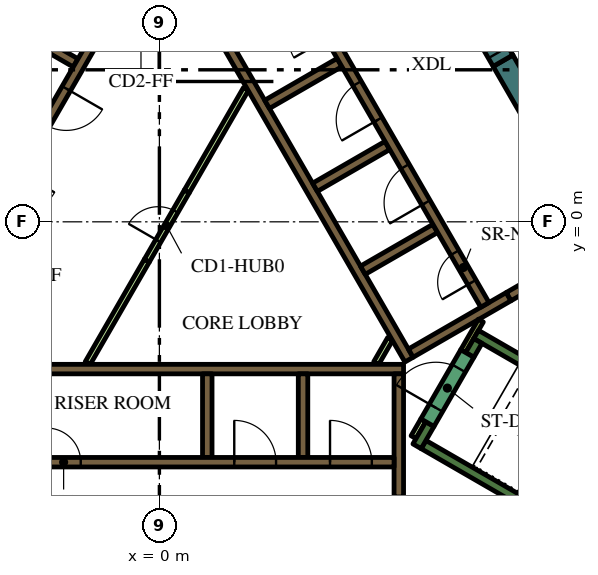
"""IFC4 building model, lengths in metres.
Left out: names, types, materials, properties, quantities, classifications, styles, units other than length and angle.
Written with IfcOpenShell. Run it as: python <this file> out.ifc"""

import sys

from ifc_helpers import new_model, si_unit, direction, frame, frame_2d, origin, place, context, subcontext, project, spatial, rectangle, extrude, element, fill, save


model = new_model("IFC4")
c1 = context("Model", 3, precision=1e-05, world=origin(), true_north=direction((0.0, 1.0)))
c2 = subcontext(c1, "Body", "Model", "MODEL_VIEW")
j1 = project(units=[si_unit("LENGTHUNIT", "METRE"), si_unit("PLANEANGLEUNIT", "RADIAN")], contexts=[c1])
p1 = place(None, origin())
s1 = spatial("IfcSite", under=j1, at=p1, CompositionType="ELEMENT")
p2 = place(p1, origin())
s2 = spatial("IfcBuilding", under=s1, at=p2, CompositionType="ELEMENT")
p3 = place(p2, frame((0.0, 0.0, 313.2)))
s3 = spatial("IfcBuildingStorey", under=s2, at=p3, CompositionType="ELEMENT", Elevation=313.2)
p4 = place(p3, frame((9.042, 4.239, 0.0), z_axis=(0.0, 0.0, 1.0), x_axis=(0.500005785455, -0.866022063525, 0.0)))
e1 = element("IfcWall", 1, at=p4, inside=s3, PredefinedType="SOLIDWALL", context=c2, shape_type="SweptSolid", body=[
    extrude(rectangle(XDim=12.406, YDim=0.6, at=frame_2d((6.203, 0.0))), origin(), (0.0, 0.0, 1.0), 4.2),
])
p5 = place(p3, frame((12.84, -9.261, 0.0), z_axis=(0.0, 0.0, 1.0), x_axis=(-0.866013990052, 0.500019768644, 0.0)))
e2 = element("IfcWall", 2, at=p5, inside=s3, PredefinedType="SOLIDWALL", context=c2, shape_type="SweptSolid", body=[
    extrude(rectangle(XDim=6.8, YDim=0.25, at=frame_2d((3.4, 0.0))), origin(), (0.0, 0.0, 1.0), 4.2),
])
p6 = place(p3, frame((6.78, -5.906, 0.0), z_axis=(0.0, 0.0, 1.0), x_axis=(0.500223362819, 0.865896406789, 0.0)))
e3 = element("IfcWall", 3, at=p6, inside=s3, PredefinedType="SOLIDWALL", context=c2, shape_type="SweptSolid", body=[
    extrude(rectangle(XDim=0.675, YDim=0.25, at=frame_2d((0.337, 0.0))), origin(), (0.0, 0.0, 1.0), 4.2),
])
p7 = place(p3, frame((8.334, -2.964, 0.0), z_axis=(0.0, 0.0, 1.0), x_axis=(0.866016039709, -0.500016218704, 0.0)))
e4 = element("IfcWall", 4, at=p7, inside=s3, PredefinedType="SOLIDWALL", context=c2, shape_type="SweptSolid", body=[
    extrude(rectangle(XDim=7.05, YDim=0.25, at=frame_2d((3.525, 0.0))), origin(), (0.0, 0.0, 1.0), 4.2),
])
p8 = place(p3, frame((8.168, -3.503, 0.0), z_axis=(0.0, 0.0, 1.0), x_axis=(0.49972245349, 0.866185586049, 0.0)))
e5 = element("IfcWall", 5, at=p8, inside=s3, PredefinedType="SOLIDWALL", context=c2, shape_type="SweptSolid", body=[
    extrude(rectangle(XDim=0.425, YDim=0.25, at=frame_2d((0.212, 0.0))), origin(), (0.0, 0.0, 1.0), 4.2),
])
p9 = place(p3, frame((-5.545, -3.875, 0.0), z_axis=(0.0, 0.0, 1.0), x_axis=(1.0, 0.0, 0.0)))
e6 = element("IfcWall", 6, at=p9, inside=s3, PredefinedType="SOLIDWALL", context=c2, shape_type="SweptSolid", body=[
    extrude(rectangle(XDim=11.97, YDim=0.25, at=frame_2d((5.985, 0.0))), origin(), (0.0, 0.0, 1.0), 4.2),
])
p10 = place(p3, frame((6.3, -7.24, 0.0), z_axis=(0.0, 0.0, 1.0), x_axis=(0.0, 1.0, 0.0)))
e7 = element("IfcWall", 7, at=p10, inside=s3, PredefinedType="SOLIDWALL", context=c2, shape_type="SweptSolid", body=[
    extrude(rectangle(XDim=3.24, YDim=0.25, at=frame_2d((1.62, 0.0))), origin(), (0.0, 0.0, 1.0), 4.2),
])
for number, where, z_axis, x_axis in (
    (8, (3.78, -4.0, 0.0), (0.0, 0.0, 1.0), (0.0, -1.0, 0.0)),
    (9, (1.26, -4.0, 0.0), (0.0, 0.0, 1.0), (0.0, -1.0, 0.0)),
):
    element("IfcWall", number, at=place(p3, frame(where, z_axis=z_axis, x_axis=x_axis)), inside=s3, PredefinedType="SOLIDWALL", context=c2, shape_type="SweptSolid", body=[
        extrude(rectangle(XDim=2.2, YDim=0.25, at=frame_2d((1.1, 0.0))), origin(), (0.0, 0.0, 1.0), 4.2),
    ])
p11 = place(p3, frame((6.568, -3.627, 0.0), z_axis=(0.0, 0.0, 1.0), x_axis=(-0.499999455981, 0.866025717874, 0.0)))
e10 = element("IfcWall", 10, at=p11, inside=s3, PredefinedType="SOLIDWALL", context=c2, shape_type="SweptSolid", body=[
    extrude(rectangle(XDim=11.978, YDim=0.25, at=frame_2d((5.989, 0.0))), origin(), (0.0, 0.0, 1.0), 4.2),
])
for number, where, z_axis, x_axis in (
    (11, (2.834, 3.091, 0.0), (0.0, 0.0, 1.0), (0.866, 0.5, 0.0)),
    (12, (4.094, 0.909, 0.0), (0.0, 0.0, 1.0), (0.866, 0.5, 0.0)),
    (13, (5.354, -1.274, 0.0), (0.0, 0.0, 1.0), (0.866, 0.5, 0.0)),
):
    element("IfcWall", number, at=place(p3, frame(where, z_axis=z_axis, x_axis=x_axis)), inside=s3, PredefinedType="SOLIDWALL", context=c2, shape_type="SweptSolid", body=[
        extrude(rectangle(XDim=2.2, YDim=0.25, at=frame_2d((1.1, 0.0))), origin(), (0.0, 0.0, 1.0), 4.2),
    ])
p12 = place(p3, frame((6.614, -3.456, 0.0), z_axis=(0.0, 0.0, 1.0), x_axis=(0.866032512851, 0.499987686533, 0.0)))
e14 = element("IfcWall", 14, at=p12, inside=s3, PredefinedType="SOLIDWALL", context=c2, shape_type="SweptSolid", body=[
    extrude(rectangle(XDim=2.975, YDim=0.25, at=frame_2d((1.487, 0.0))), origin(), (0.0, 0.0, 1.0), 4.2),
])
p13 = place(p3, frame((-8.06, -1.311, 0.0), z_axis=(0.0, 0.0, 1.0), x_axis=(0.50000273126, 0.866023826885, 0.0)))
e15 = element("IfcWall", 15, at=p13, inside=s3, PredefinedType="SOLIDWALL", context=c2, shape_type="SweptSolid", body=[
    extrude(rectangle(XDim=10.33, YDim=0.25, at=frame_2d((5.165, 0.0))), origin(), (0.0, 0.0, 1.0), 4.2),
])
p14 = place(p3, frame((-2.204, 4.182, 0.0), z_axis=(0.0, 0.0, 1.0), x_axis=(-0.866008176907, 0.50002983664, 0.0)))
e16 = element("IfcWall", 16, at=p14, inside=s3, PredefinedType="SOLIDWALL", context=c2, shape_type="SweptSolid", body=[
    extrude(rectangle(XDim=2.2, YDim=0.25, at=frame_2d((1.1, 0.0))), origin(), (0.0, 0.0, 1.0), 4.2),
])
p15 = place(p3, frame((6.945, -5.222, 0.0), z_axis=(0.0, 0.0, 1.0), x_axis=(-0.499818422106, -0.866130212453, 0.0)))
e17 = element("IfcWall", 17, at=p15, inside=s3, PredefinedType="PARTITIONING", context=c2, shape_type="SweptSolid", body=[
    extrude(rectangle(XDim=0.514, YDim=0.15, at=frame_2d((0.257, 0.0))), origin(), (0.0, 0.0, 1.0), 3.55),
])
p16 = place(p3, frame((8.459, -2.599, 0.0), z_axis=(0.0, 0.0, 1.0), x_axis=(-0.500041054325, -0.866001699761, 0.0)))
e18 = element("IfcWall", 18, at=p16, inside=s3, PredefinedType="PARTITIONING", context=c2, shape_type="SweptSolid", body=[
    extrude(rectangle(XDim=0.929, YDim=0.15, at=frame_2d((0.464, 0.0))), origin(), (0.0, 0.0, 1.0), 4.2),
])
p17 = place(p3, frame((5.705, -3.718, 0.0), z_axis=(0.0, 0.0, 1.0), x_axis=(0.499962090823, 0.866047289552, 0.0)))
e19 = element("IfcWall", 19, at=p17, inside=s3, PredefinedType="PARTITIONING", context=c2, shape_type="SweptSolid", body=[
    extrude(rectangle(XDim=0.735, YDim=0.15, at=frame_2d((0.367, 0.0))), origin(), (0.0, 0.0, 1.0), 3.55),
])
p18 = place(p3, frame((-1.887, -3.718, 0.0), z_axis=(0.0, 0.0, 1.0), x_axis=(0.500043732237, 0.866000153493, 0.0)))
e20 = element("IfcWall", 20, at=p18, inside=s3, PredefinedType="PARTITIONING", context=c2, shape_type="SweptSolid", body=[
    extrude(rectangle(XDim=3.114, YDim=0.15, at=frame_2d((1.557, 0.0))), origin(), (0.0, 0.0, 1.0), 3.55),
])
p19 = place(p3, frame((0.72, 0.797, 0.0), z_axis=(0.0, 0.0, 1.0), x_axis=(0.499984921984, 0.866034108906, 0.0)))
e21 = element("IfcWall", 21, at=p19, inside=s3, PredefinedType="PARTITIONING", context=c2, shape_type="SweptSolid", body=[
    extrude(rectangle(XDim=3.113, YDim=0.15, at=frame_2d((1.557, 0.0))), origin(), (0.0, 0.0, 1.0), 3.55),
])
p20 = place(p3, frame((-6.175, -6.325, 0.0), z_axis=(0.0, 0.0, 1.0), x_axis=(1.0, 0.0, 0.0)))
e22 = element("IfcWall", 22, at=p20, inside=s3, PredefinedType="SOLIDWALL", context=c2, shape_type="SweptSolid", body=[
    extrude(rectangle(XDim=12.35, YDim=0.25, at=frame_2d((6.175, 0.0))), origin(), (0.0, 0.0, 1.0), 4.2),
])
p21 = place(p20, frame((3.205, 0.0, 0.0)))
e23 = element("IfcOpeningElement", 23, at=p21, cuts=e22, PredefinedType="OPENING", context=c2, shape_type="SweptSolid", body=[
    extrude(rectangle(XDim=0.9, YDim=2.1, at=frame_2d((0.45, 1.05))), frame((0.0, 0.135, 0.0), z_axis=(0.0, -1.0, 0.0), x_axis=(1.0, 0.0, 0.0)), (0.0, 0.0, 1.0), 0.27),
])
p22 = place(p20, frame((8.145, 0.0, 0.0)))
e24 = element("IfcOpeningElement", 24, at=p22, cuts=e22, PredefinedType="OPENING", context=c2, shape_type="SweptSolid", body=[
    extrude(rectangle(XDim=1.1, YDim=2.1, at=frame_2d((0.55, 1.05))), frame((0.0, 0.135, 0.0), z_axis=(0.0, -1.0, 0.0), x_axis=(1.0, 0.0, 0.0)), (0.0, 0.0, 1.0), 0.27),
])
p23 = place(p20, frame((10.665, 0.0, 0.0)))
e25 = element("IfcOpeningElement", 25, at=p23, cuts=e22, PredefinedType="OPENING", context=c2, shape_type="SweptSolid", body=[
    extrude(rectangle(XDim=1.1, YDim=2.1, at=frame_2d((0.55, 1.05))), frame((0.0, 0.135, 0.0), z_axis=(0.0, -1.0, 0.0), x_axis=(1.0, 0.0, 0.0)), (0.0, 0.0, 1.0), 0.27),
])
p24 = place(p3, frame((8.565, -2.185, 0.0), z_axis=(0.0, 0.0, 1.0), x_axis=(-0.499997954832, 0.866026584559, 0.0)))
e26 = element("IfcWall", 26, at=p24, inside=s3, PredefinedType="SOLIDWALL", context=c2, shape_type="SweptSolid", body=[
    extrude(rectangle(XDim=12.35, YDim=0.25, at=frame_2d((6.175, 0.0))), origin(), (0.0, 0.0, 1.0), 4.2),
])
p25 = place(p24, frame((0.685, 0.0, 0.0)))
e27 = element("IfcOpeningElement", 27, at=p25, cuts=e26, PredefinedType="OPENING", context=c2, shape_type="SweptSolid", body=[
    extrude(rectangle(XDim=0.9, YDim=2.1, at=frame_2d((0.45, 1.05))), frame((0.0, 0.135, 0.0), z_axis=(0.0, -1.0, 0.0), x_axis=(1.0, 0.0, 0.0)), (0.0, 0.0, 1.0), 0.27),
])
p26 = place(p24, frame((3.105, 0.0, 0.0)))
e28 = element("IfcOpeningElement", 28, at=p26, cuts=e26, PredefinedType="OPENING", context=c2, shape_type="SweptSolid", body=[
    extrude(rectangle(XDim=1.1, YDim=2.1, at=frame_2d((0.55, 1.05))), frame((0.0, 0.135, 0.0), z_axis=(0.0, -1.0, 0.0), x_axis=(1.0, 0.0, 0.0)), (0.0, 0.0, 1.0), 0.27),
])
p27 = place(p24, frame((5.625, 0.0, 0.0)))
e29 = element("IfcOpeningElement", 29, at=p27, cuts=e26, PredefinedType="OPENING", context=c2, shape_type="SweptSolid", body=[
    extrude(rectangle(XDim=1.1, YDim=2.1, at=frame_2d((0.55, 1.05))), frame((0.0, 0.135, 0.0), z_axis=(0.0, -1.0, 0.0), x_axis=(1.0, 0.0, 0.0)), (0.0, 0.0, 1.0), 0.27),
])
p28 = place(p24, frame((8.145, 0.0, 0.0)))
e30 = element("IfcOpeningElement", 30, at=p28, cuts=e26, PredefinedType="OPENING", context=c2, shape_type="SweptSolid", body=[
    extrude(rectangle(XDim=1.1, YDim=2.1, at=frame_2d((0.55, 1.05))), frame((0.0, 0.135, 0.0), z_axis=(0.0, -1.0, 0.0), x_axis=(1.0, 0.0, 0.0)), (0.0, 0.0, 1.0), 0.27),
])
p29 = place(p24, frame((10.665, 0.0, 0.0)))
e31 = element("IfcOpeningElement", 31, at=p29, cuts=e26, PredefinedType="OPENING", context=c2, shape_type="SweptSolid", body=[
    extrude(rectangle(XDim=1.1, YDim=2.1, at=frame_2d((0.55, 1.05))), frame((0.0, 0.135, 0.0), z_axis=(0.0, -1.0, 0.0), x_axis=(1.0, 0.0, 0.0)), (0.0, 0.0, 1.0), 0.27),
])
p30 = place(p3, frame((-0.898, 6.194, 0.0), z_axis=(0.0, 0.0, 1.0), x_axis=(-0.499996202215, -0.866027596426, 0.0)))
e32 = element("IfcWall", 32, at=p30, inside=s3, PredefinedType="SOLIDWALL", context=c2, shape_type="SweptSolid", body=[
    extrude(rectangle(XDim=9.83, YDim=0.25, at=frame_2d((4.915, 0.0))), origin(), (0.0, 0.0, 1.0), 4.2),
])
p31 = place(p30, frame((0.585, 0.0, 0.0)))
e33 = element("IfcOpeningElement", 33, at=p31, cuts=e32, PredefinedType="OPENING", context=c2, shape_type="SweptSolid", body=[
    extrude(rectangle(XDim=1.1, YDim=2.1, at=frame_2d((0.55, 1.05))), frame((0.0, 0.135, 0.0), z_axis=(0.0, -1.0, 0.0), x_axis=(1.0, 0.0, 0.0)), (0.0, 0.0, 1.0), 0.27),
])
p32 = place(p30, frame((3.105, 0.0, 0.0)))
e34 = element("IfcOpeningElement", 34, at=p32, cuts=e32, PredefinedType="OPENING", context=c2, shape_type="SweptSolid", body=[
    extrude(rectangle(XDim=1.1, YDim=2.1, at=frame_2d((0.55, 1.05))), frame((0.0, 0.135, 0.0), z_axis=(0.0, -1.0, 0.0), x_axis=(1.0, 0.0, 0.0)), (0.0, 0.0, 1.0), 0.27),
])
p33 = place(p30, frame((5.625, 0.0, 0.0)))
e35 = element("IfcOpeningElement", 35, at=p33, cuts=e32, PredefinedType="OPENING", context=c2, shape_type="SweptSolid", body=[
    extrude(rectangle(XDim=1.1, YDim=2.1, at=frame_2d((0.55, 1.05))), frame((0.0, 0.135, 0.0), z_axis=(0.0, -1.0, 0.0), x_axis=(1.0, 0.0, 0.0)), (0.0, 0.0, 1.0), 0.27),
])
p34 = place(p30, frame((8.145, 0.0, 0.0)))
e36 = element("IfcOpeningElement", 36, at=p34, cuts=e32, PredefinedType="OPENING", context=c2, shape_type="SweptSolid", body=[
    extrude(rectangle(XDim=1.1, YDim=2.1, at=frame_2d((0.55, 1.05))), frame((0.0, 0.135, 0.0), z_axis=(0.0, -1.0, 0.0), x_axis=(1.0, 0.0, 0.0)), (0.0, 0.0, 1.0), 0.27),
])
p35 = place(p3, frame((7.053, -5.284, 0.0), z_axis=(0.0, 0.0, 1.0), x_axis=(0.500078061341, 0.865980330357, 0.0)))
e37 = element("IfcWall", 37, at=p35, inside=s3, PredefinedType="SOLIDWALL", context=c2, shape_type="SweptSolid", body=[
    extrude(rectangle(XDim=2.1, YDim=0.4, at=frame_2d((1.05, 0.0))), origin(), (0.0, 0.0, 1.0), 4.2),
])
p36 = place(p35, frame((0.45, 0.0, 0.0)))
e38 = element("IfcOpeningElement", 38, at=p36, cuts=e37, PredefinedType="OPENING", context=c2, shape_type="SweptSolid", body=[
    extrude(rectangle(XDim=1.2, YDim=2.1, at=frame_2d((0.6, 1.05))), frame((0.0, 0.21, 0.0), z_axis=(0.0, -1.0, 0.0), x_axis=(1.0, 0.0, 0.0)), (0.0, 0.0, 1.0), 0.42),
])
p37 = place(p3, frame((-0.33, -1.022, 0.0), z_axis=(0.0, 0.0, 1.0), x_axis=(0.500027713859, 0.866009402589, 0.0)))
e39 = element("IfcWall", 39, at=p37, inside=s3, PredefinedType="PARTITIONING", context=c2, shape_type="SweptSolid", body=[
    extrude(rectangle(XDim=2.1, YDim=0.15, at=frame_2d((1.05, 0.0))), origin(), (0.0, 0.0, 1.0), 3.55),
])
p38 = place(p37, frame((0.6, 0.0, 0.0)))
e40 = element("IfcOpeningElement", 40, at=p38, cuts=e39, PredefinedType="OPENING", context=c2, shape_type="SweptSolid", body=[
    extrude(rectangle(XDim=0.9, YDim=2.1, at=frame_2d((0.45, 1.05))), frame((0.0, 0.085, 0.0), z_axis=(0.0, -1.0, 0.0), x_axis=(1.0, 0.0, 0.0)), (0.0, 0.0, 1.0), 0.17),
])
p39 = place(p3, frame((11.009, -0.919, 0.0), z_axis=(0.0, 0.0, 1.0), x_axis=(-0.866059744384, -0.49994051562, 0.0)))
e41 = element("IfcWall", 41, at=p39, inside=s3, PredefinedType="SOLIDWALL", context=c2, shape_type="SweptSolid", body=[
    extrude(rectangle(XDim=2.1, YDim=0.25, at=frame_2d((1.05, 0.0))), origin(), (0.0, 0.0, 1.0), 4.2),
])
p40 = place(p39, frame((0.45, 0.0, 0.0)))
e42 = element("IfcOpeningElement", 42, at=p40, cuts=e41, PredefinedType="OPENING", context=c2, shape_type="SweptSolid", body=[
    extrude(rectangle(XDim=1.2, YDim=2.1, at=frame_2d((0.6, 1.05))), frame((0.0, 0.135, 0.0), z_axis=(0.0, -1.0, 0.0), x_axis=(1.0, 0.0, 0.0)), (0.0, 0.0, 1.0), 0.27),
])
p41 = place(p3, frame((8.192, 5.711, 0.0), z_axis=(0.0, 0.0, 1.0), x_axis=(0.500062241894, -0.865989465428, 0.0)))
e43 = element("IfcWall", 43, at=p41, inside=s3, PredefinedType="SOLIDWALL", context=c2, shape_type="SweptSolid", body=[
    extrude(rectangle(XDim=1.7, YDim=0.6, at=frame_2d((0.85, 0.0))), origin(), (0.0, 0.0, 1.0), 4.2),
])
p42 = place(p41, frame((0.25, 0.0, 0.0)))
e44 = element("IfcOpeningElement", 44, at=p42, cuts=e43, PredefinedType="OPENING", context=c2, shape_type="SweptSolid", body=[
    extrude(rectangle(XDim=1.2, YDim=2.1, at=frame_2d((0.6, 1.05))), frame((0.0, 0.31, 0.0), z_axis=(0.0, -1.0, 0.0), x_axis=(1.0, 0.0, 0.0)), (0.0, 0.0, 1.0), 0.62),
])
p43 = place(p21, origin())
e45 = element("IfcDoor", 45, at=p43, inside=s3, OperationType="SINGLE_SWING_LEFT", PredefinedType="DOOR", context=c2, shape_type="SweptSolid", body=[
    extrude(rectangle(XDim=0.9, YDim=2.1, at=frame_2d((0.45, 1.05))), frame((0.0, 0.025, 0.0), z_axis=(0.0, -1.0, 0.0), x_axis=(1.0, 0.0, 0.0)), (0.0, 0.0, 1.0), 0.05),
])
fill(e23, e45)
p44 = place(p22, origin())
e46 = element("IfcDoor", 46, at=p44, inside=s3, OperationType="DOUBLE_DOOR_SLIDING", PredefinedType="DOOR", context=c2, shape_type="SweptSolid", body=[
    extrude(rectangle(XDim=1.1, YDim=2.1, at=frame_2d((0.55, 1.05))), frame((0.0, 0.025, 0.0), z_axis=(0.0, -1.0, 0.0), x_axis=(1.0, 0.0, 0.0)), (0.0, 0.0, 1.0), 0.05),
])
fill(e24, e46)
p45 = place(p23, origin())
e47 = element("IfcDoor", 47, at=p45, inside=s3, OperationType="DOUBLE_DOOR_SLIDING", PredefinedType="DOOR", context=c2, shape_type="SweptSolid", body=[
    extrude(rectangle(XDim=1.1, YDim=2.1, at=frame_2d((0.55, 1.05))), frame((0.0, 0.025, 0.0), z_axis=(0.0, -1.0, 0.0), x_axis=(1.0, 0.0, 0.0)), (0.0, 0.0, 1.0), 0.05),
])
fill(e25, e47)
p46 = place(p25, origin())
e48 = element("IfcDoor", 48, at=p46, inside=s3, OperationType="SINGLE_SWING_LEFT", PredefinedType="DOOR", context=c2, shape_type="SweptSolid", body=[
    extrude(rectangle(XDim=0.9, YDim=2.1, at=frame_2d((0.45, 1.05))), frame((0.0, 0.025, 0.0), z_axis=(0.0, -1.0, 0.0), x_axis=(1.0, 0.0, 0.0)), (0.0, 0.0, 1.0), 0.05),
])
fill(e27, e48)
p47 = place(p26, origin())
e49 = element("IfcDoor", 49, at=p47, inside=s3, OperationType="DOUBLE_DOOR_SLIDING", PredefinedType="DOOR", context=c2, shape_type="SweptSolid", body=[
    extrude(rectangle(XDim=1.1, YDim=2.1, at=frame_2d((0.55, 1.05))), frame((0.0, 0.025, 0.0), z_axis=(0.0, -1.0, 0.0), x_axis=(1.0, 0.0, 0.0)), (0.0, 0.0, 1.0), 0.05),
])
fill(e28, e49)
p48 = place(p27, origin())
e50 = element("IfcDoor", 50, at=p48, inside=s3, OperationType="DOUBLE_DOOR_SLIDING", PredefinedType="DOOR", context=c2, shape_type="SweptSolid", body=[
    extrude(rectangle(XDim=1.1, YDim=2.1, at=frame_2d((0.55, 1.05))), frame((0.0, 0.025, 0.0), z_axis=(0.0, -1.0, 0.0), x_axis=(1.0, 0.0, 0.0)), (0.0, 0.0, 1.0), 0.05),
])
fill(e29, e50)
p49 = place(p32, origin())
e51 = element("IfcDoor", 51, at=p49, inside=s3, OperationType="DOUBLE_DOOR_SLIDING", PredefinedType="DOOR", context=c2, shape_type="SweptSolid", body=[
    extrude(rectangle(XDim=1.1, YDim=2.1, at=frame_2d((0.55, 1.05))), frame((0.0, 0.025, 0.0), z_axis=(0.0, -1.0, 0.0), x_axis=(1.0, 0.0, 0.0)), (0.0, 0.0, 1.0), 0.05),
])
fill(e34, e51)
p50 = place(p36, origin())
e52 = element("IfcDoor", 52, at=p50, inside=s3, OperationType="SINGLE_SWING_LEFT", PredefinedType="DOOR", context=c2, shape_type="SweptSolid", body=[
    extrude(rectangle(XDim=1.2, YDim=2.1, at=frame_2d((0.6, 1.05))), frame((0.0, 0.025, 0.0), z_axis=(0.0, -1.0, 0.0), x_axis=(1.0, 0.0, 0.0)), (0.0, 0.0, 1.0), 0.05),
])
fill(e38, e52)
p51 = place(p38, origin())
e53 = element("IfcDoor", 53, at=p51, inside=s3, OperationType="SINGLE_SWING_LEFT", PredefinedType="DOOR", context=c2, shape_type="SweptSolid", body=[
    extrude(rectangle(XDim=0.9, YDim=2.1, at=frame_2d((0.45, 1.05))), frame((0.0, 0.025, 0.0), z_axis=(0.0, -1.0, 0.0), x_axis=(1.0, 0.0, 0.0)), (0.0, 0.0, 1.0), 0.05),
])
fill(e40, e53)
p52 = place(p42, origin())
e54 = element("IfcDoor", 54, at=p52, inside=s3, OperationType="SINGLE_SWING_LEFT", PredefinedType="DOOR", context=c2, shape_type="SweptSolid", body=[
    extrude(rectangle(XDim=1.2, YDim=2.1, at=frame_2d((0.6, 1.05))), frame((0.0, 0.025, 0.0), z_axis=(0.0, -1.0, 0.0), x_axis=(1.0, 0.0, 0.0)), (0.0, 0.0, 1.0), 0.05),
])
fill(e44, e54)
save(model, sys.argv[1])
